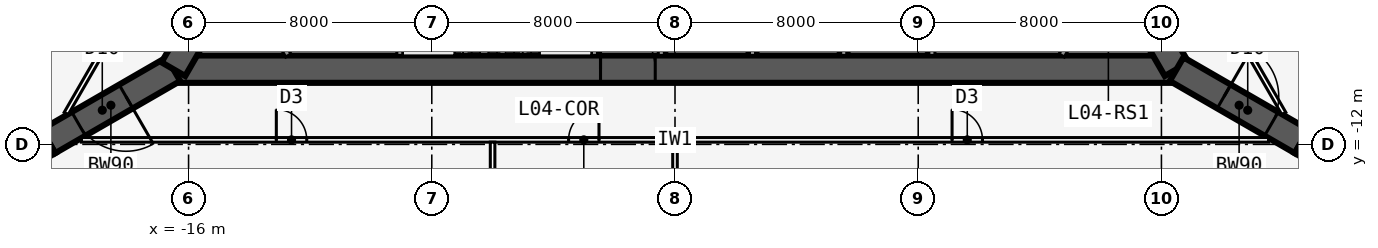
"""IFC4 building model, lengths in metres.
Left out: names, types, materials, properties, quantities, classifications, styles, units other than length and angle.
Written with IfcOpenShell. Run it as: python <this file> out.ifc"""

import sys

from ifc_helpers import new_model, si_unit, direction, frame, frame_2d, origin, place, context, subcontext, project, spatial, rectangle, extrude, element, fill, save


model = new_model("IFC4")
c1 = context("Model", 3, precision=1e-05, world=origin(), true_north=direction((0.0, 1.0)))
c2 = subcontext(c1, "Body", "Model", "MODEL_VIEW")
j1 = project(units=[si_unit("LENGTHUNIT", "METRE"), si_unit("PLANEANGLEUNIT", "RADIAN")], contexts=[c1])
p1 = place(None, origin())
s1 = spatial("IfcSite", under=j1, at=p1, CompositionType="ELEMENT")
p2 = place(p1, origin())
s2 = spatial("IfcBuilding", under=s1, at=p2, CompositionType="ELEMENT")
p3 = place(p2, frame((0.0, 0.0, 22.5)))
s3 = spatial("IfcBuildingStorey", under=s2, at=p3, CompositionType="ELEMENT", Elevation=22.5)
p4 = place(p3, frame((-16.5, -9.526, 0.0), z_axis=(0.0, 0.0, 1.0), x_axis=(1.0, 0.0, 0.0)))
e1 = element("IfcWall", 1, at=p4, inside=s3, PredefinedType="SHEAR", context=c2, shape_type="SweptSolid", body=[
    extrude(rectangle(XDim=33.0, YDim=0.9, at=frame_2d((16.5, 0.0))), origin(), (0.0, 0.0, 1.0), 6.0),
])
p5 = place(p4, frame((14.05, 0.0, 0.0)))
e2 = element("IfcOpeningElement", 2, at=p5, cuts=e1, PredefinedType="OPENING", context=c2, shape_type="SweptSolid", body=[
    extrude(rectangle(XDim=1.8, YDim=2.13, at=frame_2d((0.9, 1.065))), frame((0.0, 0.46, 0.0), z_axis=(0.0, -1.0, 0.0), x_axis=(1.0, 0.0, 0.0)), (0.0, 0.0, 1.0), 0.92),
])
p6 = place(p3, frame((-9.05, -5.951, 0.0), z_axis=(0.0, 0.0, 1.0), x_axis=(0.0, -1.0, 0.0)))
e3 = element("IfcWall", 3, at=p6, inside=s3, PredefinedType="SOLIDWALL", context=c2, shape_type="SweptSolid", body=[
    extrude(rectangle(XDim=3.125, YDim=0.2, at=frame_2d((1.562, 0.0))), origin(), (0.0, 0.0, 1.0), 5.835),
])
p7 = place(p3, frame((-2.65, -5.951, 0.0), z_axis=(0.0, 0.0, 1.0), x_axis=(0.0, -1.0, 0.0)))
e4 = element("IfcWall", 4, at=p7, inside=s3, PredefinedType="SOLIDWALL", context=c2, shape_type="SweptSolid", body=[
    extrude(rectangle(XDim=3.125, YDim=0.2, at=frame_2d((1.562, 0.0))), origin(), (0.0, 0.0, 1.0), 5.835),
])
p8 = place(p7, frame((1.525, 0.0, 0.0)))
e5 = element("IfcOpeningElement", 5, at=p8, cuts=e4, PredefinedType="OPENING", context=c2, shape_type="SweptSolid", body=[
    extrude(rectangle(XDim=1.0, YDim=2.13, at=frame_2d((0.5, 1.065))), frame((0.0, 0.11, 0.0), z_axis=(0.0, -1.0, 0.0), x_axis=(1.0, 0.0, 0.0)), (0.0, 0.0, 1.0), 0.22),
])
for number, where, z_axis, x_axis in (
    (6, (-0.45, -5.951, 0.0), (0.0, 0.0, 1.0), (0.0, -1.0, 0.0)),
    (7, (2.55, -5.951, 0.0), (0.0, 0.0, 1.0), (0.0, -1.0, 0.0)),
    (8, (5.55, -5.951, 0.0), (0.0, 0.0, 1.0), (0.0, -1.0, 0.0)),
    (9, (8.45, -5.951, 0.0), (0.0, 0.0, 1.0), (0.0, -1.0, 0.0)),
):
    element("IfcWall", number, at=place(p3, frame(where, z_axis=z_axis, x_axis=x_axis)), inside=s3, PredefinedType="SOLIDWALL", context=c2, shape_type="SweptSolid", body=[
        extrude(rectangle(XDim=3.125, YDim=0.2, at=frame_2d((1.562, 0.0))), origin(), (0.0, 0.0, 1.0), 5.835),
    ])
p9 = place(p3, frame((16.5, -9.526, 0.0), z_axis=(0.0, 0.0, 1.0), x_axis=(-0.499999749417, 0.866025548458, 0.0)))
e10 = element("IfcWall", 10, at=p9, inside=s3, PredefinedType="SHEAR", context=c2, shape_type="SweptSolid", body=[
    extrude(rectangle(XDim=33.0, YDim=0.9, at=frame_2d((16.5, 0.0))), origin(), (0.0, 0.0, 1.0), 6.0),
])
p10 = place(p9, frame((14.15, 0.0, 0.0)))
e11 = element("IfcOpeningElement", 11, at=p10, cuts=e10, PredefinedType="OPENING", context=c2, shape_type="SweptSolid", body=[
    extrude(rectangle(XDim=1.8, YDim=2.13, at=frame_2d((0.9, 1.065))), frame((0.0, 0.46, 0.0), z_axis=(0.0, -1.0, 0.0), x_axis=(1.0, 0.0, 0.0)), (0.0, 0.0, 1.0), 0.92),
])
p11 = place(p9, frame((12.6, 0.0, 0.0)))
e12 = element("IfcOpeningElement", 12, at=p11, cuts=e10, PredefinedType="OPENING", context=c2, shape_type="SweptSolid", body=[
    extrude(rectangle(XDim=1.0, YDim=2.13, at=frame_2d((0.5, 1.065))), frame((0.0, 0.46, 0.0), z_axis=(0.0, -1.0, 0.0), x_axis=(1.0, 0.0, 0.0)), (0.0, 0.0, 1.0), 0.92),
])
p12 = place(p3, frame((0.0, 19.052, 0.0), z_axis=(0.0, 0.0, 1.0), x_axis=(-0.499999749417, -0.866025548458, 0.0)))
e13 = element("IfcWall", 13, at=p12, inside=s3, PredefinedType="SHEAR", context=c2, shape_type="SweptSolid", body=[
    extrude(rectangle(XDim=33.0, YDim=0.9, at=frame_2d((16.5, 0.0))), origin(), (0.0, 0.0, 1.0), 6.0),
])
p13 = place(p12, frame((14.15, 0.0, 0.0)))
e14 = element("IfcOpeningElement", 14, at=p13, cuts=e13, PredefinedType="OPENING", context=c2, shape_type="SweptSolid", body=[
    extrude(rectangle(XDim=1.8, YDim=2.13, at=frame_2d((0.9, 1.065))), frame((0.0, 0.46, 0.0), z_axis=(0.0, -1.0, 0.0), x_axis=(1.0, 0.0, 0.0)), (0.0, 0.0, 1.0), 0.92),
])
p14 = place(p12, frame((12.6, 0.0, 0.0)))
e15 = element("IfcOpeningElement", 15, at=p14, cuts=e13, PredefinedType="OPENING", context=c2, shape_type="SweptSolid", body=[
    extrude(rectangle(XDim=1.0, YDim=2.13, at=frame_2d((0.5, 1.065))), frame((0.0, 0.46, 0.0), z_axis=(0.0, -1.0, 0.0), x_axis=(1.0, 0.0, 0.0)), (0.0, 0.0, 1.0), 0.92),
])
p15 = place(p3, frame((16.5, -9.526, 0.0), z_axis=(0.0, 0.0, 1.0), x_axis=(0.866031398331, -0.499989616998, 0.0)))
e16 = element("IfcWall", 16, at=p15, inside=s3, PredefinedType="SHEAR", context=c2, shape_type="SweptSolid", body=[
    extrude(rectangle(XDim=4.746, YDim=0.9, at=frame_2d((2.373, 0.0))), origin(), (0.0, 0.0, 1.0), 6.0),
])
p16 = place(p15, frame((1.8, 0.0, 0.0)))
e17 = element("IfcOpeningElement", 17, at=p16, cuts=e16, PredefinedType="OPENING", context=c2, shape_type="SweptSolid", body=[
    extrude(rectangle(XDim=1.8, YDim=2.13, at=frame_2d((0.9, 1.065))), frame((0.0, 0.46, 0.0), z_axis=(0.0, -1.0, 0.0), x_axis=(1.0, 0.0, 0.0)), (0.0, 0.0, 1.0), 0.92),
])
p17 = place(p3, frame((20.61, -11.899, 0.0), z_axis=(0.0, 0.0, 1.0), x_axis=(0.866009537788, -0.500027479704, 0.0)))
e18 = element("IfcWall", 18, at=p17, inside=s3, PredefinedType="SHEAR", context=c2, shape_type="SweptSolid", body=[
    extrude(rectangle(XDim=1.155, YDim=0.9, at=frame_2d((0.577, 0.0))), origin(), (0.0, 0.0, 1.0), 6.0),
])
p18 = place(p3, frame((-16.5, -9.526, 0.0), z_axis=(0.0, 0.0, 1.0), x_axis=(-0.866031398331, -0.499989616998, 0.0)))
e19 = element("IfcWall", 19, at=p18, inside=s3, PredefinedType="SHEAR", context=c2, shape_type="SweptSolid", body=[
    extrude(rectangle(XDim=4.746, YDim=0.9, at=frame_2d((2.373, 0.0))), origin(), (0.0, 0.0, 1.0), 6.0),
])
p19 = place(p18, frame((1.8, 0.0, 0.0)))
e20 = element("IfcOpeningElement", 20, at=p19, cuts=e19, PredefinedType="OPENING", context=c2, shape_type="SweptSolid", body=[
    extrude(rectangle(XDim=1.8, YDim=2.13, at=frame_2d((0.9, 1.065))), frame((0.0, 0.46, 0.0), z_axis=(0.0, -1.0, 0.0), x_axis=(1.0, 0.0, 0.0)), (0.0, 0.0, 1.0), 0.92),
])
p20 = place(p3, frame((-20.61, -11.899, 0.0), z_axis=(0.0, 0.0, 1.0), x_axis=(-0.866009537788, -0.500027479704, 0.0)))
e21 = element("IfcWall", 21, at=p20, inside=s3, PredefinedType="SHEAR", context=c2, shape_type="SweptSolid", body=[
    extrude(rectangle(XDim=1.155, YDim=0.9, at=frame_2d((0.577, 0.0))), origin(), (0.0, 0.0, 1.0), 6.0),
])
p21 = place(p3, frame((-19.527, -11.851, 0.0), z_axis=(0.0, 0.0, 1.0), x_axis=(1.0, 0.0, 0.0)))
e22 = element("IfcWall", 22, at=p21, inside=s3, PredefinedType="PARTITIONING", context=c2, shape_type="SweptSolid", body=[
    extrude(rectangle(XDim=39.054, YDim=0.15, at=frame_2d((19.527, 0.0))), origin(), (0.0, 0.0, 1.0), 5.835),
])
p22 = place(p21, frame((6.414, 0.0, 0.0)))
e23 = element("IfcOpeningElement", 23, at=p22, cuts=e22, PredefinedType="OPENING", context=c2, shape_type="SweptSolid", body=[
    extrude(rectangle(XDim=1.0, YDim=2.13, at=frame_2d((0.5, 1.065))), frame((0.0, 0.085, 0.0), z_axis=(0.0, -1.0, 0.0), x_axis=(1.0, 0.0, 0.0)), (0.0, 0.0, 1.0), 0.17),
])
p23 = place(p21, frame((16.027, 0.0, 0.0)))
e24 = element("IfcOpeningElement", 24, at=p23, cuts=e22, PredefinedType="OPENING", context=c2, shape_type="SweptSolid", body=[
    extrude(rectangle(XDim=1.0, YDim=2.13, at=frame_2d((0.5, 1.065))), frame((0.0, 0.085, 0.0), z_axis=(0.0, -1.0, 0.0), x_axis=(1.0, 0.0, 0.0)), (0.0, 0.0, 1.0), 0.17),
])
p24 = place(p21, frame((28.64, 0.0, 0.0)))
e25 = element("IfcOpeningElement", 25, at=p24, cuts=e22, PredefinedType="OPENING", context=c2, shape_type="SweptSolid", body=[
    extrude(rectangle(XDim=1.0, YDim=2.13, at=frame_2d((0.5, 1.065))), frame((0.0, 0.085, 0.0), z_axis=(0.0, -1.0, 0.0), x_axis=(1.0, 0.0, 0.0)), (0.0, 0.0, 1.0), 0.17),
])
p25 = place(p3, frame((-6.0, -11.926, 0.0), z_axis=(0.0, 0.0, 1.0), x_axis=(0.0, -1.0, 0.0)))
e26 = element("IfcWall", 26, at=p25, inside=s3, PredefinedType="PARTITIONING", context=c2, shape_type="SweptSolid", body=[
    extrude(rectangle(XDim=9.852, YDim=0.15, at=frame_2d((4.926, 0.0))), origin(), (0.0, 0.0, 1.0), 5.835),
])
p26 = place(p3, frame((0.0, -11.926, 0.0), z_axis=(0.0, 0.0, 1.0), x_axis=(0.0, -1.0, 0.0)))
e27 = element("IfcWall", 27, at=p26, inside=s3, PredefinedType="PARTITIONING", context=c2, shape_type="SweptSolid", body=[
    extrude(rectangle(XDim=10.096, YDim=0.15, at=frame_2d((5.048, 0.0))), origin(), (0.0, 0.0, 1.0), 4.794),
])
p27 = place(p3, frame((20.027, -10.985, 0.0), z_axis=(0.0, 0.0, 1.0), x_axis=(-0.500001677587, 0.866024435227, 0.0)))
e28 = element("IfcWall", 28, at=p27, inside=s3, PredefinedType="PARTITIONING", context=c2, shape_type="SweptSolid", body=[
    extrude(rectangle(XDim=39.054, YDim=0.15, at=frame_2d((19.527, 0.0))), origin(), (0.0, 0.0, 1.0), 5.835),
])
p28 = place(p27, frame((6.914, 0.0, 0.0)))
e29 = element("IfcOpeningElement", 29, at=p28, cuts=e28, PredefinedType="OPENING", context=c2, shape_type="SweptSolid", body=[
    extrude(rectangle(XDim=1.0, YDim=2.13, at=frame_2d((0.5, 1.065))), frame((0.0, 0.085, 0.0), z_axis=(0.0, -1.0, 0.0), x_axis=(1.0, 0.0, 0.0)), (0.0, 0.0, 1.0), 0.17),
])
p29 = place(p27, frame((18.527, 0.0, 0.0)))
e30 = element("IfcOpeningElement", 30, at=p29, cuts=e28, PredefinedType="OPENING", context=c2, shape_type="SweptSolid", body=[
    extrude(rectangle(XDim=1.0, YDim=2.13, at=frame_2d((0.5, 1.065))), frame((0.0, 0.085, 0.0), z_axis=(0.0, -1.0, 0.0), x_axis=(1.0, 0.0, 0.0)), (0.0, 0.0, 1.0), 0.17),
])
p30 = place(p27, frame((30.64, 0.0, 0.0)))
e31 = element("IfcOpeningElement", 31, at=p30, cuts=e28, PredefinedType="OPENING", context=c2, shape_type="SweptSolid", body=[
    extrude(rectangle(XDim=1.0, YDim=2.13, at=frame_2d((0.5, 1.065))), frame((0.0, 0.085, 0.0), z_axis=(0.0, -1.0, 0.0), x_axis=(1.0, 0.0, 0.0)), (0.0, 0.0, 1.0), 0.17),
])
p31 = place(p3, frame((-0.5, 22.836, 0.0), z_axis=(0.0, 0.0, 1.0), x_axis=(-0.500001677587, -0.866024435227, 0.0)))
e32 = element("IfcWall", 32, at=p31, inside=s3, PredefinedType="PARTITIONING", context=c2, shape_type="SweptSolid", body=[
    extrude(rectangle(XDim=39.054, YDim=0.15, at=frame_2d((19.527, 0.0))), origin(), (0.0, 0.0, 1.0), 5.835),
])
p32 = place(p31, frame((5.914, 0.0, 0.0)))
e33 = element("IfcOpeningElement", 33, at=p32, cuts=e32, PredefinedType="OPENING", context=c2, shape_type="SweptSolid", body=[
    extrude(rectangle(XDim=1.0, YDim=2.13, at=frame_2d((0.5, 1.065))), frame((0.0, 0.085, 0.0), z_axis=(0.0, -1.0, 0.0), x_axis=(1.0, 0.0, 0.0)), (0.0, 0.0, 1.0), 0.17),
])
p33 = place(p31, frame((16.527, 0.0, 0.0)))
e34 = element("IfcOpeningElement", 34, at=p33, cuts=e32, PredefinedType="OPENING", context=c2, shape_type="SweptSolid", body=[
    extrude(rectangle(XDim=1.0, YDim=2.13, at=frame_2d((0.5, 1.065))), frame((0.0, 0.085, 0.0), z_axis=(0.0, -1.0, 0.0), x_axis=(1.0, 0.0, 0.0)), (0.0, 0.0, 1.0), 0.17),
])
p34 = place(p31, frame((29.64, 0.0, 0.0)))
e35 = element("IfcOpeningElement", 35, at=p34, cuts=e32, PredefinedType="OPENING", context=c2, shape_type="SweptSolid", body=[
    extrude(rectangle(XDim=1.0, YDim=2.13, at=frame_2d((0.5, 1.065))), frame((0.0, 0.085, 0.0), z_axis=(0.0, -1.0, 0.0), x_axis=(1.0, 0.0, 0.0)), (0.0, 0.0, 1.0), 0.17),
])
for number, where, z_axis, x_axis in (
    (36, (14.219, -6.476, 0.0), (0.0, 0.0, 1.0), (-0.5, -0.866, 0.0)),
    (37, (-12.719, -9.076, 0.0), (0.0, 0.0, 1.0), (-0.5, 0.866, 0.0)),
):
    element("IfcWall", number, at=place(p3, frame(where, z_axis=z_axis, x_axis=x_axis)), inside=s3, PredefinedType="SOLIDWALL", context=c2, shape_type="SweptSolid", body=[
        extrude(rectangle(XDim=3.002, YDim=0.2, at=frame_2d((1.501, 0.0))), origin(), (0.0, 0.0, 1.0), 5.835),
    ])
p35 = place(p22, origin())
e38 = element("IfcDoor", 38, at=p35, inside=s3, OperationType="SINGLE_SWING_LEFT", PredefinedType="DOOR", context=c2, shape_type="SweptSolid", body=[
    extrude(rectangle(XDim=1.0, YDim=2.13, at=frame_2d((0.5, 1.065))), frame((0.0, 0.025, 0.0), z_axis=(0.0, -1.0, 0.0), x_axis=(1.0, 0.0, 0.0)), (0.0, 0.0, 1.0), 0.05),
])
fill(e23, e38)
p36 = place(p23, origin())
e39 = element("IfcDoor", 39, at=p36, inside=s3, OperationType="SINGLE_SWING_RIGHT", PredefinedType="DOOR", context=c2, shape_type="SweptSolid", body=[
    extrude(rectangle(XDim=1.0, YDim=2.13, at=frame_2d((0.5, 1.065))), frame((0.0, 0.025, 0.0), z_axis=(0.0, -1.0, 0.0), x_axis=(1.0, 0.0, 0.0)), (0.0, 0.0, 1.0), 0.05),
])
fill(e24, e39)
p37 = place(p24, origin())
e40 = element("IfcDoor", 40, at=p37, inside=s3, OperationType="SINGLE_SWING_LEFT", PredefinedType="DOOR", context=c2, shape_type="SweptSolid", body=[
    extrude(rectangle(XDim=1.0, YDim=2.13, at=frame_2d((0.5, 1.065))), frame((0.0, 0.025, 0.0), z_axis=(0.0, -1.0, 0.0), x_axis=(1.0, 0.0, 0.0)), (0.0, 0.0, 1.0), 0.05),
])
fill(e25, e40)
p38 = place(p5, origin())
e41 = element("IfcDoor", 41, at=p38, inside=s3, OperationType="DOUBLE_DOOR_SINGLE_SWING", PredefinedType="DOOR", context=c2, shape_type="SweptSolid", body=[
    extrude(rectangle(XDim=1.8, YDim=2.13, at=frame_2d((0.9, 1.065))), frame((0.0, 0.025, 0.0), z_axis=(0.0, -1.0, 0.0), x_axis=(1.0, 0.0, 0.0)), (0.0, 0.0, 1.0), 0.05),
])
fill(e2, e41)
p39 = place(p16, origin())
e42 = element("IfcDoor", 42, at=p39, inside=s3, OperationType="DOUBLE_DOOR_DOUBLE_SWING", PredefinedType="DOOR", context=c2, shape_type="SweptSolid", body=[
    extrude(rectangle(XDim=1.8, YDim=2.13, at=frame_2d((0.9, 1.065))), frame((0.0, 0.025, 0.0), z_axis=(0.0, -1.0, 0.0), x_axis=(1.0, 0.0, 0.0)), (0.0, 0.0, 1.0), 0.05),
])
fill(e17, e42)
p40 = place(p19, origin())
e43 = element("IfcDoor", 43, at=p40, inside=s3, OperationType="DOUBLE_DOOR_DOUBLE_SWING", PredefinedType="DOOR", context=c2, shape_type="SweptSolid", body=[
    extrude(rectangle(XDim=1.8, YDim=2.13, at=frame_2d((0.9, 1.065))), frame((0.0, 0.025, 0.0), z_axis=(0.0, -1.0, 0.0), x_axis=(1.0, 0.0, 0.0)), (0.0, 0.0, 1.0), 0.05),
])
fill(e20, e43)
save(model, sys.argv[1])
